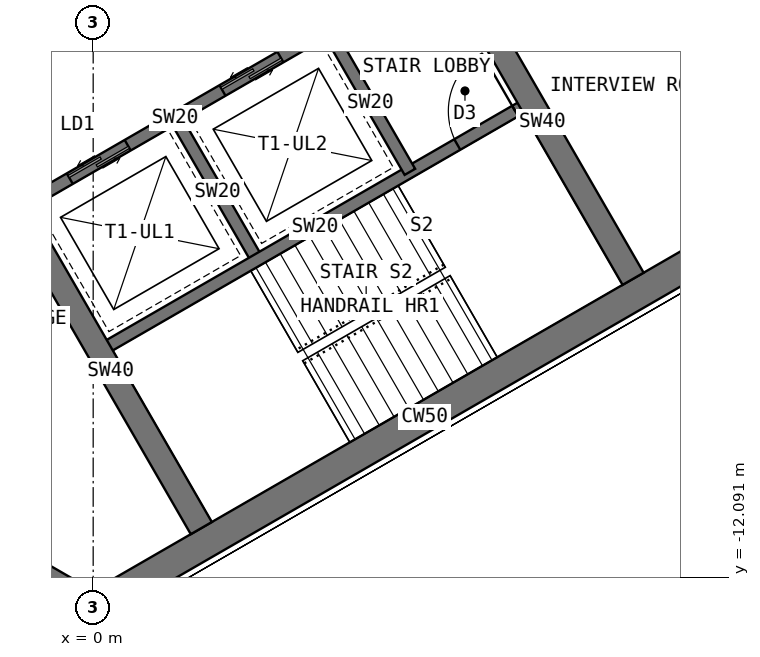
"""IFC4 building model, lengths in metres.
Left out: names, types, materials, properties, quantities, classifications, styles, units other than length and angle.
Written with IfcOpenShell. Run it as: python <this file> out.ifc"""

import sys

from ifc_helpers import new_model, si_unit, direction, frame, frame_2d, origin, place, context, subcontext, project, spatial, rectangle, extrude, element, fill, save


model = new_model("IFC4")
c1 = context("Model", 3, precision=1e-05, world=origin(), true_north=direction((0.0, 1.0)))
c2 = subcontext(c1, "Body", "Model", "MODEL_VIEW")
j1 = project(units=[si_unit("LENGTHUNIT", "METRE"), si_unit("PLANEANGLEUNIT", "RADIAN")], contexts=[c1])
p1 = place(None, origin())
s1 = spatial("IfcSite", under=j1, at=p1, CompositionType="ELEMENT")
p2 = place(p1, origin())
s2 = spatial("IfcBuilding", under=s1, at=p2, CompositionType="ELEMENT")
p3 = place(p2, frame((0.0, 0.0, 170.5)))
s3 = spatial("IfcBuildingStorey", under=s2, at=p3, CompositionType="ELEMENT", Elevation=170.5)
p4 = place(p3, frame((-3.939, -10.322, 0.0), z_axis=(0.0, 0.0, 1.0), x_axis=(0.866011268655, -0.500024481964, 0.0)))
e1 = element("IfcWall", 1, at=p4, inside=s3, PredefinedType="SHEAR", context=c2, shape_type="SweptSolid", body=[
    extrude(rectangle(XDim=4.548, YDim=0.5, at=frame_2d((2.274, 0.0))), origin(), (0.0, 0.0, 1.0), 4.0),
])
p5 = place(p3, frame((0.0, -12.596, 0.0), z_axis=(0.0, 0.0, 1.0), x_axis=(0.866021940709, 0.500005998175, 0.0)))
e2 = element("IfcWall", 2, at=p5, inside=s3, PredefinedType="SHEAR", context=c2, shape_type="SweptSolid", body=[
    extrude(rectangle(XDim=12.596, YDim=0.5, at=frame_2d((6.298, 0.0))), origin(), (0.0, 0.0, 1.0), 4.0),
])
p6 = place(p3, frame((-1.164, -5.984, 0.0), z_axis=(0.0, 0.0, 1.0), x_axis=(0.866026010844, 0.49999894854, 0.0)))
e3 = element("IfcWall", 3, at=p6, inside=s3, PredefinedType="SHEAR", context=c2, shape_type="SweptSolid", body=[
    extrude(rectangle(XDim=8.0, YDim=0.2, at=frame_2d((4.0, 0.0))), origin(), (0.0, 0.0, 1.0), 4.0),
])
p7 = place(p6, frame((6.3, 0.0, 0.0)))
e4 = element("IfcOpeningElement", 4, at=p7, cuts=e3, PredefinedType="OPENING", context=c2, shape_type="SweptSolid", body=[
    extrude(rectangle(XDim=1.2, YDim=2.1, at=frame_2d((0.6, 1.05))), frame((0.0, 0.11, 0.0), z_axis=(0.0, -1.0, 0.0), x_axis=(1.0, 0.0, 0.0)), (0.0, 0.0, 1.0), 0.22),
])
p8 = place(p6, frame((0.9, 0.0, 0.0)))
e5 = element("IfcOpeningElement", 5, at=p8, cuts=e3, PredefinedType="OPENING", context=c2, shape_type="SweptSolid", body=[
    extrude(rectangle(XDim=1.1, YDim=2.2, at=frame_2d((0.55, 1.1))), frame((0.0, 0.11, 0.0), z_axis=(0.0, -1.0, 0.0), x_axis=(1.0, 0.0, 0.0)), (0.0, 0.0, 1.0), 0.22),
])
p9 = place(p6, frame((3.8, 0.0, 0.0)))
e6 = element("IfcOpeningElement", 6, at=p9, cuts=e3, PredefinedType="OPENING", context=c2, shape_type="SweptSolid", body=[
    extrude(rectangle(XDim=1.1, YDim=2.2, at=frame_2d((0.55, 1.1))), frame((0.0, 0.11, 0.0), z_axis=(0.0, -1.0, 0.0), x_axis=(1.0, 0.0, 0.0)), (0.0, 0.0, 1.0), 0.22),
])
p10 = place(p3, frame((1.397, -4.62, 0.0), z_axis=(0.0, 0.0, 1.0), x_axis=(0.499936506574, -0.866062058628, 0.0)))
e7 = element("IfcWall", 7, at=p10, inside=s3, PredefinedType="SHEAR", context=c2, shape_type="SweptSolid", body=[
    extrude(rectangle(XDim=2.6, YDim=0.2, at=frame_2d((1.3, 0.0))), origin(), (0.0, 0.0, 1.0), 4.0),
])
p11 = place(p3, frame((3.909, -3.17, 0.0), z_axis=(0.0, 0.0, 1.0), x_axis=(0.49997716683, -0.86603858612, 0.0)))
e8 = element("IfcWall", 8, at=p11, inside=s3, PredefinedType="SHEAR", context=c2, shape_type="SweptSolid", body=[
    extrude(rectangle(XDim=2.6, YDim=0.2, at=frame_2d((1.3, 0.0))), origin(), (0.0, 0.0, 1.0), 4.0),
])
p12 = place(p3, frame((0.186, -8.322, 0.0), z_axis=(0.0, 0.0, 1.0), x_axis=(0.866026010844, 0.49999894854, 0.0)))
e9 = element("IfcWall", 9, at=p12, inside=s3, PredefinedType="SHEAR", context=c2, shape_type="SweptSolid", body=[
    extrude(rectangle(XDim=8.0, YDim=0.2, at=frame_2d((4.0, 0.0))), origin(), (0.0, 0.0, 1.0), 4.0),
])
p13 = place(p12, frame((6.7, 0.0, 0.0)))
e10 = element("IfcOpeningElement", 10, at=p13, cuts=e9, PredefinedType="OPENING", context=c2, shape_type="SweptSolid", body=[
    extrude(rectangle(XDim=1.1, YDim=2.1, at=frame_2d((0.55, 1.05))), frame((0.0, 0.11, 0.0), z_axis=(0.0, -1.0, 0.0), x_axis=(1.0, 0.0, 0.0)), (0.0, 0.0, 1.0), 0.22),
])
p14 = place(p3, frame((5.901, -2.02, 0.0), z_axis=(0.0, 0.0, 1.0), x_axis=(0.500003832394, -0.86602319114, 0.0)))
e11 = element("IfcWall", 11, at=p14, inside=s3, PredefinedType="SHEAR", context=c2, shape_type="SweptSolid", body=[
    extrude(rectangle(XDim=5.958, YDim=0.4, at=frame_2d((2.979, 0.0))), origin(), (0.0, 0.0, 1.0), 4.0),
])
p15 = place(p3, frame((-1.201, -6.12, 0.0), z_axis=(0.0, 0.0, 1.0), x_axis=(0.500021575205, -0.866012946976, 0.0)))
e12 = element("IfcWall", 12, at=p15, inside=s3, PredefinedType="SHEAR", context=c2, shape_type="SweptSolid", body=[
    extrude(rectangle(XDim=5.958, YDim=0.4, at=frame_2d((2.979, 0.0))), origin(), (0.0, 0.0, 1.0), 4.0),
])
p16 = place(p8, origin())
e13 = element("IfcDoor", 13, at=p16, inside=s3, OperationType="DOUBLE_DOOR_SLIDING", PredefinedType="DOOR", context=c2, shape_type="SweptSolid", body=[
    extrude(rectangle(XDim=1.1, YDim=2.2, at=frame_2d((0.55, 1.1))), frame((0.0, 0.025, 0.0), z_axis=(0.0, -1.0, 0.0), x_axis=(1.0, 0.0, 0.0)), (0.0, 0.0, 1.0), 0.05),
])
fill(e5, e13)
p17 = place(p9, origin())
e14 = element("IfcDoor", 14, at=p17, inside=s3, OperationType="DOUBLE_DOOR_SLIDING", PredefinedType="DOOR", context=c2, shape_type="SweptSolid", body=[
    extrude(rectangle(XDim=1.1, YDim=2.2, at=frame_2d((0.55, 1.1))), frame((0.0, 0.025, 0.0), z_axis=(0.0, -1.0, 0.0), x_axis=(1.0, 0.0, 0.0)), (0.0, 0.0, 1.0), 0.05),
])
fill(e6, e14)
p18 = place(p13, origin())
e15 = element("IfcDoor", 15, at=p18, inside=s3, OperationType="SINGLE_SWING_RIGHT", PredefinedType="DOOR", context=c2, shape_type="SweptSolid", body=[
    extrude(rectangle(XDim=1.1, YDim=2.1, at=frame_2d((0.55, 1.05))), frame((0.0, 0.025, 0.0), z_axis=(0.0, -1.0, 0.0), x_axis=(1.0, 0.0, 0.0)), (0.0, 0.0, 1.0), 0.05),
])
fill(e10, e15)
save(model, sys.argv[1])
